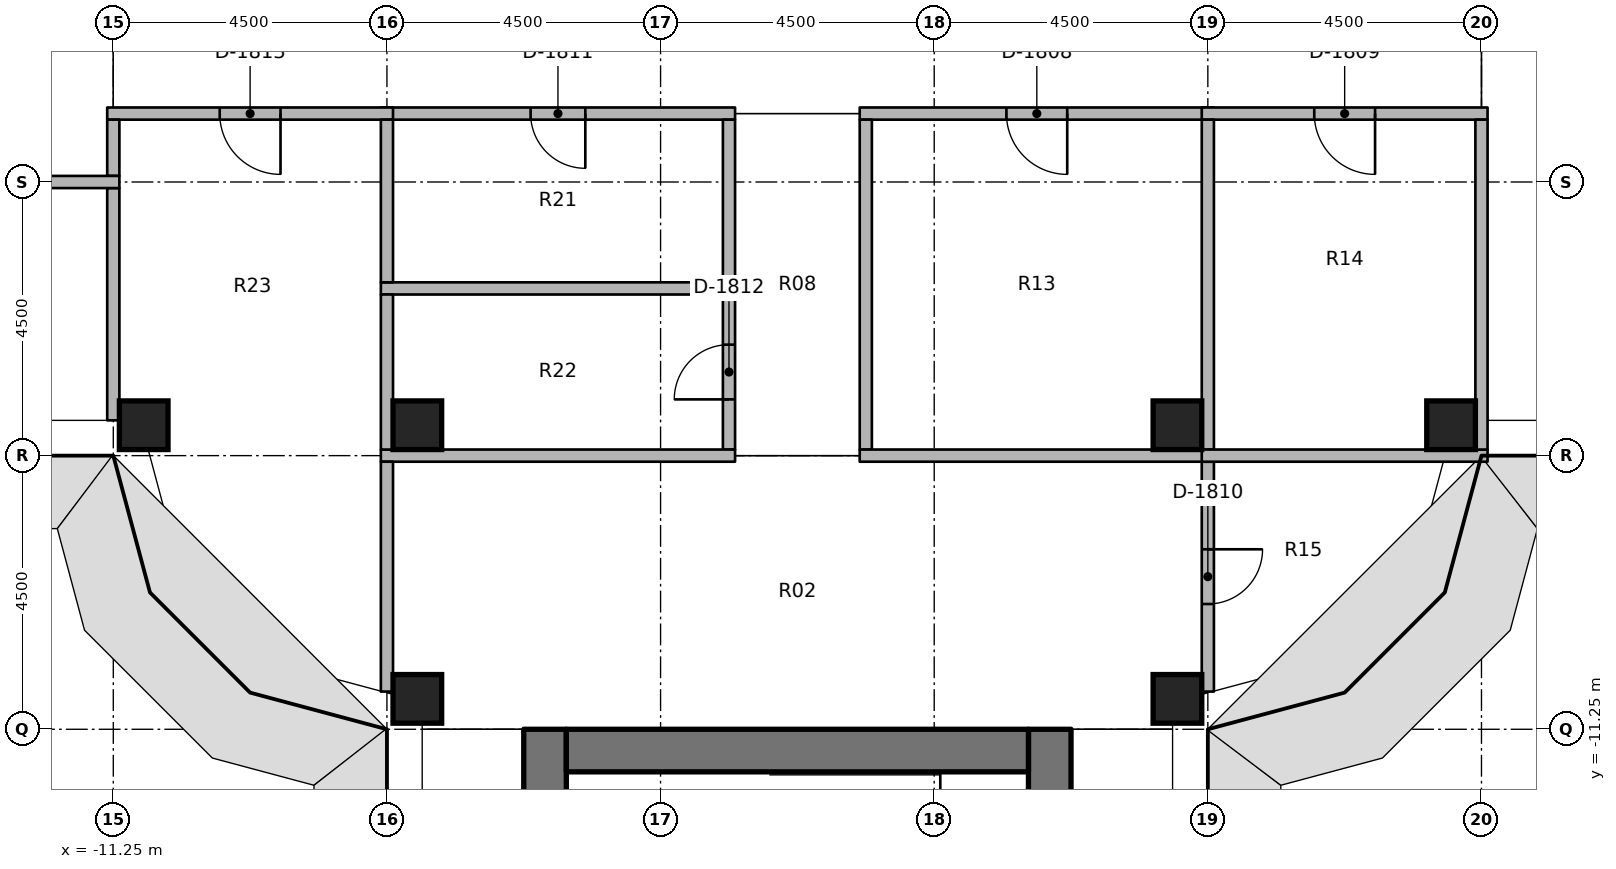
"""IFC4 building model, lengths in metres.
Left out: names, types, materials, properties, quantities, classifications, styles, units other than length and angle.
Written with IfcOpenShell. Run it as: python <this file> out.ifc"""

import sys

from ifc_helpers import new_model, si_unit, direction, frame, frame_2d, origin, origin_2d, place, context, subcontext, project, spatial, rectangle, extrude, element, fill, save


model = new_model("IFC4")
c1 = context("Model", 3, precision=1e-05, world=origin(), true_north=direction((0.0, 1.0)))
c2 = subcontext(c1, "Body", "Model", "MODEL_VIEW")
j1 = project(units=[si_unit("LENGTHUNIT", "METRE"), si_unit("PLANEANGLEUNIT", "RADIAN")], contexts=[c1])
p1 = place(None, origin())
s1 = spatial("IfcSite", under=j1, at=p1, CompositionType="ELEMENT")
p2 = place(p1, origin())
s2 = spatial("IfcBuilding", under=s1, at=p2, CompositionType="ELEMENT")
p3 = place(p2, frame((0.0, 0.0, 171.4)))
s3 = spatial("IfcBuildingStorey", under=s2, at=p3, CompositionType="ELEMENT", Elevation=171.4)
for number, where, z_axis, x_axis in (
    (1, (-10.75, -6.25, 0.0), (0.0, 0.0, 1.0), (1.0, 0.0, 0.0)),
    (2, (-6.25, -10.75, 0.0), (0.0, 0.0, 1.0), (1.0, 0.0, 0.0)),
    (3, (-6.25, -6.25, 0.0), (0.0, 0.0, 1.0), (1.0, 0.0, 0.0)),
    (4, (6.25, -10.75, 0.0), (0.0, 0.0, 1.0), (1.0, 0.0, 0.0)),
    (5, (6.25, -6.25, 0.0), (0.0, 0.0, 1.0), (1.0, 0.0, 0.0)),
    (6, (10.75, -6.25, 0.0), (0.0, 0.0, 1.0), (1.0, 0.0, 0.0)),
):
    element("IfcColumn", number, at=place(p3, frame(where, z_axis=z_axis, x_axis=x_axis)), inside=s3, PredefinedType="COLUMN", context=c2, shape_type="SweptSolid", body=[
        extrude(rectangle(XDim=0.8, YDim=0.8, at=origin_2d()), origin(), (0.0, 0.0, 1.0), 3.65),
    ])
p4 = place(p3, frame((-4.15, -11.25, 0.0), z_axis=(0.0, 0.0, 1.0), x_axis=(0.0, -1.0, 0.0)))
e7 = element("IfcWall", 7, at=p4, inside=s3, PredefinedType="SHEAR", context=c2, shape_type="SweptSolid", body=[
    extrude(rectangle(XDim=15.0, YDim=0.7, at=frame_2d((7.5, 0.0))), origin(), (0.0, 0.0, 1.0), 3.8),
])
p5 = place(p4, frame((7.15, 0.0, 0.0)))
e8 = element("IfcOpeningElement", 8, at=p5, cuts=e7, PredefinedType="OPENING", context=c2, shape_type="SweptSolid", body=[
    extrude(rectangle(XDim=1.5, YDim=2.3, at=frame_2d((0.75, 1.15))), frame((0.0, 0.36, 0.0), z_axis=(0.0, -1.0, 0.0), x_axis=(1.0, 0.0, 0.0)), (0.0, 0.0, 1.0), 0.72),
])
p6 = place(p4, frame((5.55, 0.0, 0.0)))
e9 = element("IfcOpeningElement", 9, at=p6, cuts=e7, PredefinedType="OPENING", context=c2, shape_type="SweptSolid", body=[
    extrude(rectangle(XDim=1.2, YDim=2.1, at=frame_2d((0.6, 1.05))), frame((0.0, 0.36, 0.0), z_axis=(0.0, -1.0, 0.0), x_axis=(1.0, 0.0, 0.0)), (0.0, 0.0, 1.0), 0.72),
])
p7 = place(p3, frame((4.15, -11.25, 0.0), z_axis=(0.0, 0.0, 1.0), x_axis=(0.0, -1.0, 0.0)))
e10 = element("IfcWall", 10, at=p7, inside=s3, PredefinedType="SHEAR", context=c2, shape_type="SweptSolid", body=[
    extrude(rectangle(XDim=15.0, YDim=0.7, at=frame_2d((7.5, 0.0))), origin(), (0.0, 0.0, 1.0), 3.8),
])
p8 = place(p7, frame((7.15, 0.0, 0.0)))
e11 = element("IfcOpeningElement", 11, at=p8, cuts=e10, PredefinedType="OPENING", context=c2, shape_type="SweptSolid", body=[
    extrude(rectangle(XDim=1.5, YDim=2.3, at=frame_2d((0.75, 1.15))), frame((0.0, 0.36, 0.0), z_axis=(0.0, -1.0, 0.0), x_axis=(1.0, 0.0, 0.0)), (0.0, 0.0, 1.0), 0.72),
])
p9 = place(p7, frame((13.9, 0.0, 0.0)))
e12 = element("IfcOpeningElement", 12, at=p9, cuts=e10, PredefinedType="OPENING", context=c2, shape_type="SweptSolid", body=[
    extrude(rectangle(XDim=0.9, YDim=2.1, at=frame_2d((0.45, 1.05))), frame((0.0, 0.36, 0.0), z_axis=(0.0, -1.0, 0.0), x_axis=(1.0, 0.0, 0.0)), (0.0, 0.0, 1.0), 0.72),
])
p10 = place(p7, frame((1.15, 0.0, 0.0)))
e13 = element("IfcOpeningElement", 13, at=p10, cuts=e10, PredefinedType="OPENING", context=c2, shape_type="SweptSolid", body=[
    extrude(rectangle(XDim=1.2, YDim=2.1, at=frame_2d((0.6, 1.05))), frame((0.0, 0.36, 0.0), z_axis=(0.0, -1.0, 0.0), x_axis=(1.0, 0.0, 0.0)), (0.0, 0.0, 1.0), 0.72),
])
p11 = place(p3, frame((-3.8, -11.6, 0.0), z_axis=(0.0, 0.0, 1.0), x_axis=(1.0, 0.0, 0.0)))
e14 = element("IfcWall", 14, at=p11, inside=s3, PredefinedType="SHEAR", context=c2, shape_type="SweptSolid", body=[
    extrude(rectangle(XDim=7.6, YDim=0.7, at=frame_2d((3.8, 0.0))), origin(), (0.0, 0.0, 1.0), 3.8),
])
p12 = place(p3, frame((6.85, -1.125, 0.0), z_axis=(0.0, 0.0, 1.0), x_axis=(-1.0, 0.0, 0.0)))
e15 = element("IfcWall", 15, at=p12, inside=s3, PredefinedType="PARTITIONING", context=c2, shape_type="SweptSolid", body=[
    extrude(rectangle(XDim=5.825, YDim=0.2, at=frame_2d((2.913, 0.0))), origin(), (0.0, 0.0, 1.0), 2.75),
])
p13 = place(p12, frame((2.413, 0.0, 0.0)))
e16 = element("IfcOpeningElement", 16, at=p13, cuts=e15, PredefinedType="OPENING", context=c2, shape_type="SweptSolid", body=[
    extrude(rectangle(XDim=1.0, YDim=2.1, at=frame_2d((0.5, 1.05))), frame((0.0, 0.11, 0.0), z_axis=(0.0, -1.0, 0.0), x_axis=(1.0, 0.0, 0.0)), (0.0, 0.0, 1.0), 0.22),
])
p14 = place(p3, frame((11.35, -1.125, 0.0), z_axis=(0.0, 0.0, 1.0), x_axis=(-1.0, 0.0, 0.0)))
e17 = element("IfcWall", 17, at=p14, inside=s3, PredefinedType="PARTITIONING", context=c2, shape_type="SweptSolid", body=[
    extrude(rectangle(XDim=4.7, YDim=0.2, at=frame_2d((2.35, 0.0))), origin(), (0.0, 0.0, 1.0), 2.75),
])
p15 = place(p14, frame((1.85, 0.0, 0.0)))
e18 = element("IfcOpeningElement", 18, at=p15, cuts=e17, PredefinedType="OPENING", context=c2, shape_type="SweptSolid", body=[
    extrude(rectangle(XDim=1.0, YDim=2.1, at=frame_2d((0.5, 1.05))), frame((0.0, 0.11, 0.0), z_axis=(0.0, -1.0, 0.0), x_axis=(1.0, 0.0, 0.0)), (0.0, 0.0, 1.0), 0.22),
])
p16 = place(p3, frame((-1.025, -1.125, 0.0), z_axis=(0.0, 0.0, 1.0), x_axis=(-1.0, 0.0, 0.0)))
e19 = element("IfcWall", 19, at=p16, inside=s3, PredefinedType="PARTITIONING", context=c2, shape_type="SweptSolid", body=[
    extrude(rectangle(XDim=5.825, YDim=0.2, at=frame_2d((2.913, 0.0))), origin(), (0.0, 0.0, 1.0), 2.75),
])
p17 = place(p16, frame((2.462, 0.0, 0.0)))
e20 = element("IfcOpeningElement", 20, at=p17, cuts=e19, PredefinedType="OPENING", context=c2, shape_type="SweptSolid", body=[
    extrude(rectangle(XDim=0.9, YDim=2.1, at=frame_2d((0.45, 1.05))), frame((0.0, 0.11, 0.0), z_axis=(0.0, -1.0, 0.0), x_axis=(1.0, 0.0, 0.0)), (0.0, 0.0, 1.0), 0.22),
])
p18 = place(p3, frame((-6.65, -1.125, 0.0), z_axis=(0.0, 0.0, 1.0), x_axis=(-1.0, 0.0, 0.0)))
e21 = element("IfcWall", 21, at=p18, inside=s3, PredefinedType="PARTITIONING", context=c2, shape_type="SweptSolid", body=[
    extrude(rectangle(XDim=4.7, YDim=0.2, at=frame_2d((2.35, 0.0))), origin(), (0.0, 0.0, 1.0), 2.75),
])
p19 = place(p18, frame((1.85, 0.0, 0.0)))
e22 = element("IfcOpeningElement", 22, at=p19, cuts=e21, PredefinedType="OPENING", context=c2, shape_type="SweptSolid", body=[
    extrude(rectangle(XDim=1.0, YDim=2.1, at=frame_2d((0.5, 1.05))), frame((0.0, 0.11, 0.0), z_axis=(0.0, -1.0, 0.0), x_axis=(1.0, 0.0, 0.0)), (0.0, 0.0, 1.0), 0.22),
])
p20 = place(p3, frame((1.125, -6.65, 0.0), z_axis=(0.0, 0.0, 1.0), x_axis=(0.0, 1.0, 0.0)))
e23 = element("IfcWall", 23, at=p20, inside=s3, PredefinedType="PARTITIONING", context=c2, shape_type="SweptSolid", body=[
    extrude(rectangle(XDim=5.425, YDim=0.2, at=frame_2d((2.712, 0.0))), origin(), (0.0, 0.0, 1.0), 2.75),
])
p21 = place(p3, frame((-1.125, -3.9, 0.0), z_axis=(0.0, 0.0, 1.0), x_axis=(0.0, 1.0, 0.0)))
e24 = element("IfcWall", 24, at=p21, inside=s3, PredefinedType="PARTITIONING", context=c2, shape_type="SweptSolid", body=[
    extrude(rectangle(XDim=2.675, YDim=0.2, at=frame_2d((1.337, 0.0))), origin(), (0.0, 0.0, 1.0), 2.75),
])
p22 = place(p3, frame((-1.125, -6.65, 0.0), z_axis=(0.0, 0.0, 1.0), x_axis=(0.0, 1.0, 0.0)))
e25 = element("IfcWall", 25, at=p22, inside=s3, PredefinedType="PARTITIONING", context=c2, shape_type="SweptSolid", body=[
    extrude(rectangle(XDim=2.55, YDim=0.2, at=frame_2d((1.275, 0.0))), origin(), (0.0, 0.0, 1.0), 2.75),
])
p23 = place(p22, frame((0.825, 0.0, 0.0)))
e26 = element("IfcOpeningElement", 26, at=p23, cuts=e25, PredefinedType="OPENING", context=c2, shape_type="SweptSolid", body=[
    extrude(rectangle(XDim=0.9, YDim=2.1, at=frame_2d((0.45, 1.05))), frame((0.0, 0.11, 0.0), z_axis=(0.0, -1.0, 0.0), x_axis=(1.0, 0.0, 0.0)), (0.0, 0.0, 1.0), 0.22),
])
p24 = place(p3, frame((1.025, -6.75, 0.0), z_axis=(0.0, 0.0, 1.0), x_axis=(1.0, 0.0, 0.0)))
e27 = element("IfcWall", 27, at=p24, inside=s3, PredefinedType="PARTITIONING", context=c2, shape_type="SweptSolid", body=[
    extrude(rectangle(XDim=5.825, YDim=0.2, at=frame_2d((2.913, 0.0))), origin(), (0.0, 0.0, 1.0), 2.75),
])
p25 = place(p3, frame((6.75, -6.85, 0.0), z_axis=(0.0, 0.0, 1.0), x_axis=(0.0, -1.0, 0.0)))
e28 = element("IfcWall", 28, at=p25, inside=s3, PredefinedType="PARTITIONING", context=c2, shape_type="SweptSolid", body=[
    extrude(rectangle(XDim=3.78, YDim=0.2, at=frame_2d((1.89, 0.0))), origin(), (0.0, 0.0, 1.0), 2.75),
])
p26 = place(p25, frame((1.44, 0.0, 0.0)))
e29 = element("IfcOpeningElement", 29, at=p26, cuts=e28, PredefinedType="OPENING", context=c2, shape_type="SweptSolid", body=[
    extrude(rectangle(XDim=0.9, YDim=2.1, at=frame_2d((0.45, 1.05))), frame((0.0, 0.11, 0.0), z_axis=(0.0, -1.0, 0.0), x_axis=(1.0, 0.0, 0.0)), (0.0, 0.0, 1.0), 0.22),
])
p27 = place(p3, frame((-6.85, -6.75, 0.0), z_axis=(0.0, 0.0, 1.0), x_axis=(1.0, 0.0, 0.0)))
e30 = element("IfcWall", 30, at=p27, inside=s3, PredefinedType="PARTITIONING", context=c2, shape_type="SweptSolid", body=[
    extrude(rectangle(XDim=5.825, YDim=0.2, at=frame_2d((2.913, 0.0))), origin(), (0.0, 0.0, 1.0), 2.75),
])
p28 = place(p3, frame((-6.75, -10.63, 0.0), z_axis=(0.0, 0.0, 1.0), x_axis=(0.0, 1.0, 0.0)))
e31 = element("IfcWall", 31, at=p28, inside=s3, PredefinedType="PARTITIONING", context=c2, shape_type="SweptSolid", body=[
    extrude(rectangle(XDim=3.78, YDim=0.2, at=frame_2d((1.89, 0.0))), origin(), (0.0, 0.0, 1.0), 2.75),
])
p29 = place(p3, frame((6.75, -6.65, 0.0), z_axis=(0.0, 0.0, 1.0), x_axis=(0.0, 1.0, 0.0)))
e32 = element("IfcWall", 32, at=p29, inside=s3, PredefinedType="PARTITIONING", context=c2, shape_type="SweptSolid", body=[
    extrude(rectangle(XDim=5.425, YDim=0.2, at=frame_2d((2.712, 0.0))), origin(), (0.0, 0.0, 1.0), 2.75),
])
p30 = place(p3, frame((6.65, -6.75, 0.0), z_axis=(0.0, 0.0, 1.0), x_axis=(1.0, 0.0, 0.0)))
e33 = element("IfcWall", 33, at=p30, inside=s3, PredefinedType="PARTITIONING", context=c2, shape_type="SweptSolid", body=[
    extrude(rectangle(XDim=4.7, YDim=0.2, at=frame_2d((2.35, 0.0))), origin(), (0.0, 0.0, 1.0), 2.75),
])
p31 = place(p3, frame((11.25, -6.65, 0.0), z_axis=(0.0, 0.0, 1.0), x_axis=(0.0, 1.0, 0.0)))
e34 = element("IfcWall", 34, at=p31, inside=s3, PredefinedType="PARTITIONING", context=c2, shape_type="SweptSolid", body=[
    extrude(rectangle(XDim=5.425, YDim=0.2, at=frame_2d((2.712, 0.0))), origin(), (0.0, 0.0, 1.0), 2.75),
])
p32 = place(p3, frame((-6.85, -4.0, 0.0), z_axis=(0.0, 0.0, 1.0), x_axis=(1.0, 0.0, 0.0)))
e35 = element("IfcWall", 35, at=p32, inside=s3, PredefinedType="PARTITIONING", context=c2, shape_type="SweptSolid", body=[
    extrude(rectangle(XDim=5.825, YDim=0.2, at=frame_2d((2.913, 0.0))), origin(), (0.0, 0.0, 1.0), 2.75),
])
p33 = place(p3, frame((-6.75, -3.9, 0.0), z_axis=(0.0, 0.0, 1.0), x_axis=(0.0, 1.0, 0.0)))
e36 = element("IfcWall", 36, at=p33, inside=s3, PredefinedType="PARTITIONING", context=c2, shape_type="SweptSolid", body=[
    extrude(rectangle(XDim=2.675, YDim=0.2, at=frame_2d((1.337, 0.0))), origin(), (0.0, 0.0, 1.0), 2.75),
])
p34 = place(p3, frame((-6.75, -6.65, 0.0), z_axis=(0.0, 0.0, 1.0), x_axis=(0.0, 1.0, 0.0)))
e37 = element("IfcWall", 37, at=p34, inside=s3, PredefinedType="PARTITIONING", context=c2, shape_type="SweptSolid", body=[
    extrude(rectangle(XDim=2.55, YDim=0.2, at=frame_2d((1.275, 0.0))), origin(), (0.0, 0.0, 1.0), 2.75),
])
p35 = place(p3, frame((-11.25, -2.15, 0.0), z_axis=(0.0, 0.0, 1.0), x_axis=(0.0, 1.0, 0.0)))
e38 = element("IfcWall", 38, at=p35, inside=s3, PredefinedType="PARTITIONING", context=c2, shape_type="SweptSolid", body=[
    extrude(rectangle(XDim=0.925, YDim=0.2, at=frame_2d((0.462, 0.0))), origin(), (0.0, 0.0, 1.0), 2.75),
])
p36 = place(p3, frame((-11.25, -6.17, 0.0), z_axis=(0.0, 0.0, 1.0), x_axis=(0.0, 1.0, 0.0)))
e39 = element("IfcWall", 39, at=p36, inside=s3, PredefinedType="PARTITIONING", context=c2, shape_type="SweptSolid", body=[
    extrude(rectangle(XDim=3.82, YDim=0.2, at=frame_2d((1.91, 0.0))), origin(), (0.0, 0.0, 1.0), 2.75),
])
p37 = place(p3, frame((-11.15, -2.25, 0.0), z_axis=(0.0, 0.0, 1.0), x_axis=(-1.0, 0.0, 0.0)))
e40 = element("IfcWall", 40, at=p37, inside=s3, PredefinedType="PARTITIONING", context=c2, shape_type="SweptSolid", body=[
    extrude(rectangle(XDim=4.7, YDim=0.2, at=frame_2d((2.35, 0.0))), origin(), (0.0, 0.0, 1.0), 2.75),
])
p38 = place(p37, frame((1.85, 0.0, 0.0)))
e41 = element("IfcOpeningElement", 41, at=p38, cuts=e40, PredefinedType="OPENING", context=c2, shape_type="SweptSolid", body=[
    extrude(rectangle(XDim=1.0, YDim=2.1, at=frame_2d((0.5, 1.05))), frame((0.0, 0.11, 0.0), z_axis=(0.0, -1.0, 0.0), x_axis=(1.0, 0.0, 0.0)), (0.0, 0.0, 1.0), 0.22),
])
p39 = place(p13, origin())
e42 = element("IfcDoor", 42, at=p39, inside=s3, OperationType="SINGLE_SWING_RIGHT", PredefinedType="DOOR", context=c2, shape_type="SweptSolid", body=[
    extrude(rectangle(XDim=1.0, YDim=2.1, at=frame_2d((0.5, 1.05))), frame((0.0, 0.025, 0.0), z_axis=(0.0, -1.0, 0.0), x_axis=(1.0, 0.0, 0.0)), (0.0, 0.0, 1.0), 0.05),
])
fill(e16, e42)
p40 = place(p15, origin())
e43 = element("IfcDoor", 43, at=p40, inside=s3, OperationType="SINGLE_SWING_RIGHT", PredefinedType="DOOR", context=c2, shape_type="SweptSolid", body=[
    extrude(rectangle(XDim=1.0, YDim=2.1, at=frame_2d((0.5, 1.05))), frame((0.0, 0.025, 0.0), z_axis=(0.0, -1.0, 0.0), x_axis=(1.0, 0.0, 0.0)), (0.0, 0.0, 1.0), 0.05),
])
fill(e18, e43)
p41 = place(p26, origin())
e44 = element("IfcDoor", 44, at=p41, inside=s3, OperationType="SINGLE_SWING_LEFT", PredefinedType="DOOR", context=c2, shape_type="SweptSolid", body=[
    extrude(rectangle(XDim=0.9, YDim=2.1, at=frame_2d((0.45, 1.05))), frame((0.0, 0.025, 0.0), z_axis=(0.0, -1.0, 0.0), x_axis=(1.0, 0.0, 0.0)), (0.0, 0.0, 1.0), 0.05),
])
fill(e29, e44)
p42 = place(p17, origin())
e45 = element("IfcDoor", 45, at=p42, inside=s3, OperationType="SINGLE_SWING_RIGHT", PredefinedType="DOOR", context=c2, shape_type="SweptSolid", body=[
    extrude(rectangle(XDim=0.9, YDim=2.1, at=frame_2d((0.45, 1.05))), frame((0.0, 0.025, 0.0), z_axis=(0.0, -1.0, 0.0), x_axis=(1.0, 0.0, 0.0)), (0.0, 0.0, 1.0), 0.05),
])
fill(e20, e45)
p43 = place(p23, origin())
e46 = element("IfcDoor", 46, at=p43, inside=s3, OperationType="SINGLE_SWING_RIGHT", PredefinedType="DOOR", context=c2, shape_type="SweptSolid", body=[
    extrude(rectangle(XDim=0.9, YDim=2.1, at=frame_2d((0.45, 1.05))), frame((0.0, 0.025, 0.0), z_axis=(0.0, -1.0, 0.0), x_axis=(1.0, 0.0, 0.0)), (0.0, 0.0, 1.0), 0.05),
])
fill(e26, e46)
p44 = place(p19, origin())
e47 = element("IfcDoor", 47, at=p44, inside=s3, OperationType="SINGLE_SWING_RIGHT", PredefinedType="DOOR", context=c2, shape_type="SweptSolid", body=[
    extrude(rectangle(XDim=1.0, YDim=2.1, at=frame_2d((0.5, 1.05))), frame((0.0, 0.025, 0.0), z_axis=(0.0, -1.0, 0.0), x_axis=(1.0, 0.0, 0.0)), (0.0, 0.0, 1.0), 0.05),
])
fill(e22, e47)
save(model, sys.argv[1])
